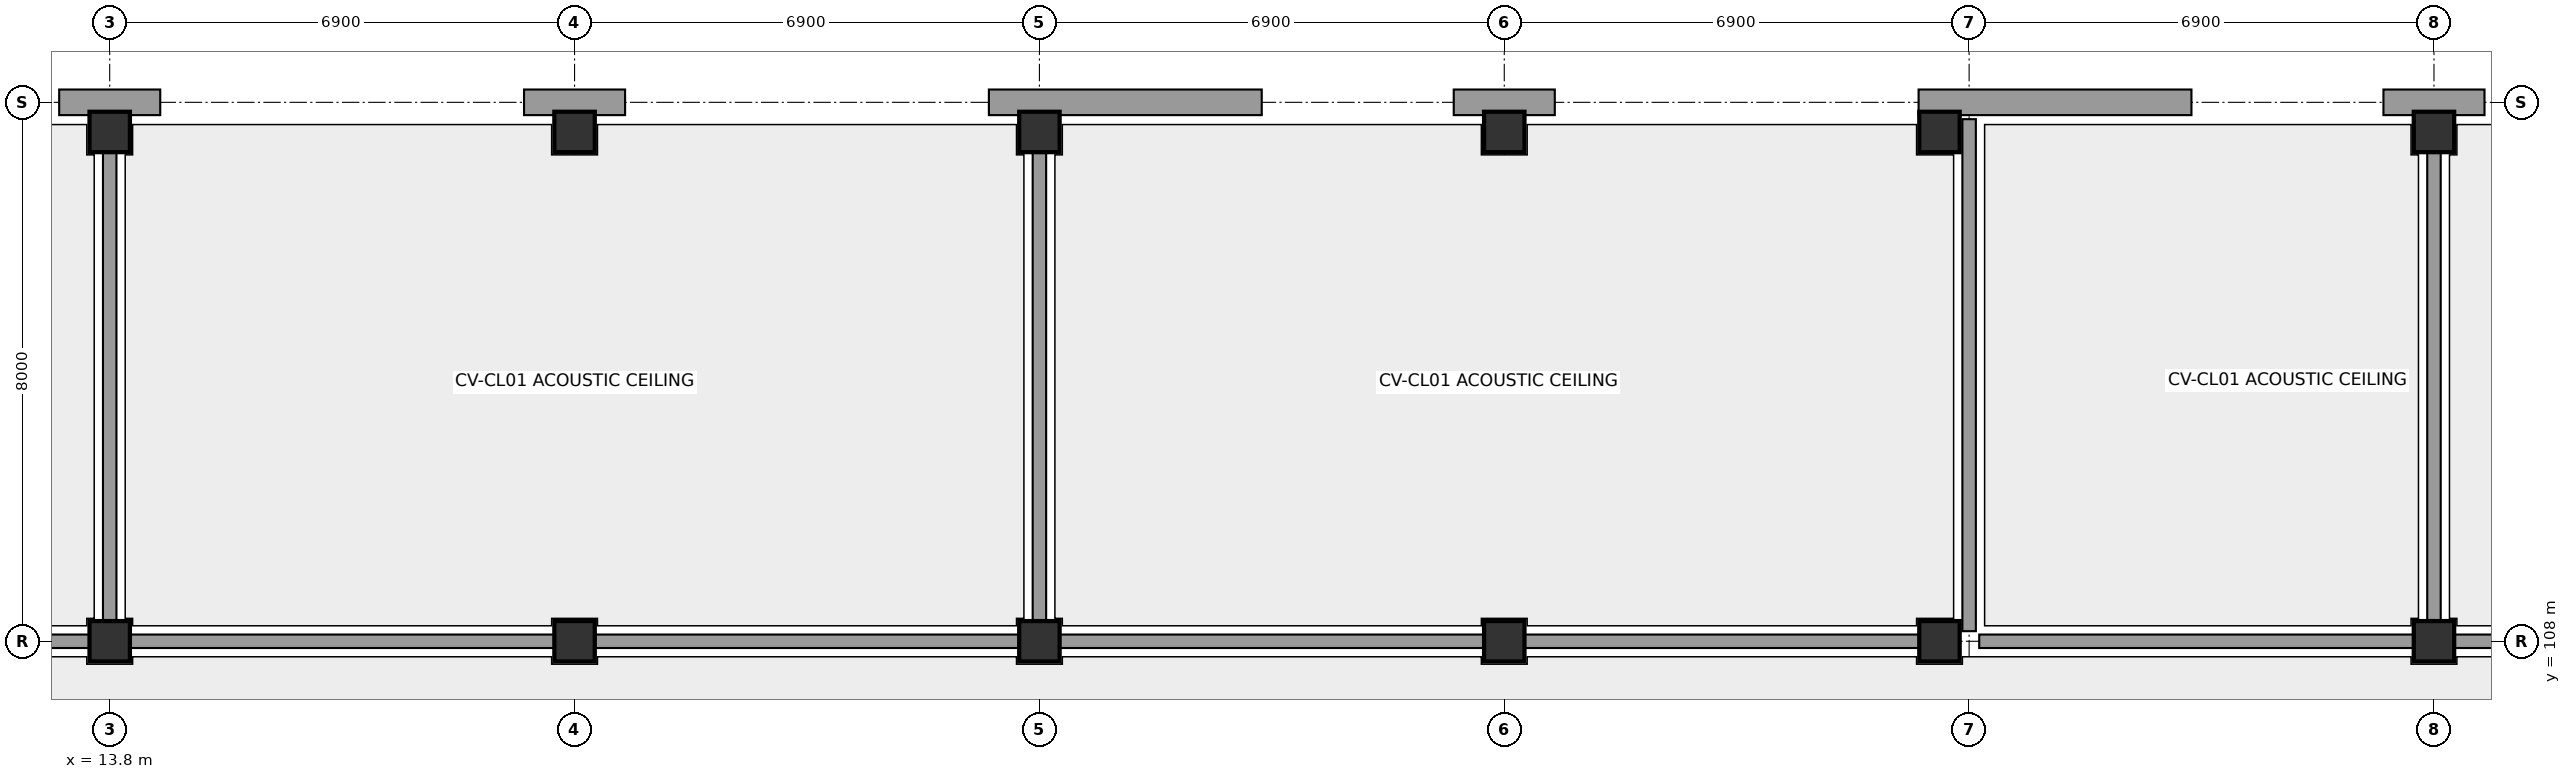
"""IFC4 building model, lengths in metres.
Left out: names, types, materials, properties, quantities, classifications, styles, units other than length and angle.
Written with IfcOpenShell. Run it as: python <this file> out.ifc"""

import sys

from ifc_helpers import new_model, si_unit, direction, frame, frame_2d, origin, origin_with_axes, origin_2d, place, context, subcontext, project, spatial, rectangle, extrude, element, fill, save


model = new_model("IFC4")
c1 = context("Model", 3, precision=1e-05, world=origin(), true_north=direction((0.0, 1.0)))
c2 = subcontext(c1, "Body", "Model", "MODEL_VIEW")
j1 = project(units=[si_unit("LENGTHUNIT", "METRE"), si_unit("PLANEANGLEUNIT", "RADIAN")], contexts=[c1])
p1 = place(None, origin())
s1 = spatial("IfcSite", under=j1, at=p1, CompositionType="ELEMENT")
p2 = place(p1, origin())
s2 = spatial("IfcBuilding", under=s1, at=p2, CompositionType="ELEMENT")
p3 = place(p2, origin())
s3 = spatial("IfcBuildingStorey", under=s2, at=p3, CompositionType="ELEMENT", Elevation=0.0)
for number, where, z_axis, x_axis in (
    (1, (13.8, 108.0, 0.0), (0.0, 0.0, 1.0), (1.0, 0.0, 0.0)),
    (2, (13.8, 115.56, 0.0), (0.0, 0.0, 1.0), (1.0, 0.0, 0.0)),
    (3, (20.7, 108.0, 0.0), (0.0, 0.0, 1.0), (1.0, 0.0, 0.0)),
    (4, (20.7, 115.56, 0.0), (0.0, 0.0, 1.0), (1.0, 0.0, 0.0)),
    (5, (27.6, 108.0, 0.0), (0.0, 0.0, 1.0), (1.0, 0.0, 0.0)),
    (6, (27.6, 115.56, 0.0), (0.0, 0.0, 1.0), (1.0, 0.0, 0.0)),
    (7, (34.5, 108.0, 0.0), (0.0, 0.0, 1.0), (1.0, 0.0, 0.0)),
    (8, (34.5, 115.56, 0.0), (0.0, 0.0, 1.0), (1.0, 0.0, 0.0)),
    (9, (40.96, 108.0, 0.0), (0.0, 0.0, 1.0), (1.0, 0.0, 0.0)),
    (10, (40.96, 115.56, 0.0), (0.0, 0.0, 1.0), (1.0, 0.0, 0.0)),
    (11, (48.3, 108.0, 0.0), (0.0, 0.0, 1.0), (1.0, 0.0, 0.0)),
    (12, (48.3, 115.56, 0.0), (0.0, 0.0, 1.0), (1.0, 0.0, 0.0)),
):
    element("IfcColumn", number, at=place(p3, frame(where, z_axis=z_axis, x_axis=x_axis)), inside=s3, PredefinedType="COLUMN", context=c2, shape_type="SweptSolid", body=[
        extrude(rectangle(XDim=0.6, YDim=0.6, at=origin_2d()), origin(), (0.0, 0.0, 1.0), 4.4),
    ])
for number, where, z_axis, x_axis in (
    (13, (13.05, 116.0, 0.0), (0.0, 0.0, 1.0), (1.0, 0.0, 0.0)),
    (14, (19.95, 116.0, 0.0), (0.0, 0.0, 1.0), (1.0, 0.0, 0.0)),
):
    element("IfcWall", number, at=place(p3, frame(where, z_axis=z_axis, x_axis=x_axis)), inside=s3, PredefinedType="STANDARD", context=c2, shape_type="SweptSolid", body=[
        extrude(rectangle(XDim=1.5, YDim=0.38, at=frame_2d((0.75, 0.0))), origin(), (0.0, 0.0, 1.0), 4.12),
    ])
p4 = place(p3, frame((26.85, 116.0, 0.0), z_axis=(0.0, 0.0, 1.0), x_axis=(1.0, 0.0, 0.0)))
e15 = element("IfcWall", 15, at=p4, inside=s3, PredefinedType="STANDARD", context=c2, shape_type="SweptSolid", body=[
    extrude(rectangle(XDim=4.05, YDim=0.38, at=frame_2d((2.025, 0.0))), origin(), (0.0, 0.0, 1.0), 4.12),
])
p5 = place(p4, frame((1.8, 0.0, 0.0)))
e16 = element("IfcOpeningElement", 16, at=p5, cuts=e15, PredefinedType="OPENING", context=c2, shape_type="SweptSolid", body=[
    extrude(rectangle(XDim=2.0, YDim=2.45, at=frame_2d((1.0, 1.225))), frame((0.0, 0.202, 0.0), z_axis=(0.0, -1.0, 0.0), x_axis=(1.0, 0.0, 0.0)), (0.0, 0.0, 1.0), 0.404),
])
p6 = place(p3, frame((33.75, 116.0, 0.0), z_axis=(0.0, 0.0, 1.0), x_axis=(1.0, 0.0, 0.0)))
e17 = element("IfcWall", 17, at=p6, inside=s3, PredefinedType="STANDARD", context=c2, shape_type="SweptSolid", body=[
    extrude(rectangle(XDim=1.5, YDim=0.38, at=frame_2d((0.75, 0.0))), origin(), (0.0, 0.0, 1.0), 4.12),
])
p7 = place(p3, frame((40.65, 116.0, 0.0), z_axis=(0.0, 0.0, 1.0), x_axis=(1.0, 0.0, 0.0)))
e18 = element("IfcWall", 18, at=p7, inside=s3, PredefinedType="STANDARD", context=c2, shape_type="SweptSolid", body=[
    extrude(rectangle(XDim=4.05, YDim=0.38, at=frame_2d((2.025, 0.0))), origin(), (0.0, 0.0, 1.0), 4.12),
])
p8 = place(p7, frame((1.8, 0.0, 0.0)))
e19 = element("IfcOpeningElement", 19, at=p8, cuts=e18, PredefinedType="OPENING", context=c2, shape_type="SweptSolid", body=[
    extrude(rectangle(XDim=2.0, YDim=2.45, at=frame_2d((1.0, 1.225))), frame((0.0, 0.202, 0.0), z_axis=(0.0, -1.0, 0.0), x_axis=(1.0, 0.0, 0.0)), (0.0, 0.0, 1.0), 0.404),
])
p9 = place(p3, frame((47.55, 116.0, 0.0), z_axis=(0.0, 0.0, 1.0), x_axis=(1.0, 0.0, 0.0)))
e20 = element("IfcWall", 20, at=p9, inside=s3, PredefinedType="STANDARD", context=c2, shape_type="SweptSolid", body=[
    extrude(rectangle(XDim=1.5, YDim=0.38, at=frame_2d((0.75, 0.0))), origin(), (0.0, 0.0, 1.0), 4.12),
])
p10 = place(p3, frame((0.3, 108.0, 0.0), z_axis=(0.0, 0.0, 1.0), x_axis=(1.0, 0.0, 0.0)))
e21 = element("IfcWall", 21, at=p10, inside=s3, PredefinedType="PARTITIONING", context=c2, shape_type="SweptSolid", body=[
    extrude(rectangle(XDim=13.35, YDim=0.2, at=frame_2d((6.675, 0.0))), origin(), (0.0, 0.0, 1.0), 3.56),
])
p11 = place(p10, frame((2.0, 0.0, 0.0)))
e22 = element("IfcOpeningElement", 22, at=p11, cuts=e21, PredefinedType="OPENING", context=c2, shape_type="SweptSolid", body=[
    extrude(rectangle(XDim=1.0, YDim=2.15, at=frame_2d((0.5, 1.075))), frame((0.0, 0.112, 0.0), z_axis=(0.0, -1.0, 0.0), x_axis=(1.0, 0.0, 0.0)), (0.0, 0.0, 1.0), 0.224),
])
p12 = place(p3, frame((13.8, 108.15, 0.0), z_axis=(0.0, 0.0, 1.0), x_axis=(0.0, 1.0, 0.0)))
e23 = element("IfcWall", 23, at=p12, inside=s3, PredefinedType="PARTITIONING", context=c2, shape_type="SweptSolid", body=[
    extrude(rectangle(XDim=7.6, YDim=0.2, at=frame_2d((3.8, 0.0))), origin(), (0.0, 0.0, 1.0), 4.12),
])
p13 = place(p3, frame((13.95, 108.0, 0.0), z_axis=(0.0, 0.0, 1.0), x_axis=(1.0, 0.0, 0.0)))
e24 = element("IfcWall", 24, at=p13, inside=s3, PredefinedType="PARTITIONING", context=c2, shape_type="SweptSolid", body=[
    extrude(rectangle(XDim=13.5, YDim=0.2, at=frame_2d((6.75, 0.0))), origin(), (0.0, 0.0, 1.0), 3.56),
])
p14 = place(p13, frame((2.0, 0.0, 0.0)))
e25 = element("IfcOpeningElement", 25, at=p14, cuts=e24, PredefinedType="OPENING", context=c2, shape_type="SweptSolid", body=[
    extrude(rectangle(XDim=1.0, YDim=2.15, at=frame_2d((0.5, 1.075))), frame((0.0, 0.112, 0.0), z_axis=(0.0, -1.0, 0.0), x_axis=(1.0, 0.0, 0.0)), (0.0, 0.0, 1.0), 0.224),
])
p15 = place(p3, frame((27.6, 108.15, 0.0), z_axis=(0.0, 0.0, 1.0), x_axis=(0.0, 1.0, 0.0)))
e26 = element("IfcWall", 26, at=p15, inside=s3, PredefinedType="PARTITIONING", context=c2, shape_type="SweptSolid", body=[
    extrude(rectangle(XDim=7.6, YDim=0.2, at=frame_2d((3.8, 0.0))), origin(), (0.0, 0.0, 1.0), 4.12),
])
p16 = place(p3, frame((27.75, 108.0, 0.0), z_axis=(0.0, 0.0, 1.0), x_axis=(1.0, 0.0, 0.0)))
e27 = element("IfcWall", 27, at=p16, inside=s3, PredefinedType="PARTITIONING", context=c2, shape_type="SweptSolid", body=[
    extrude(rectangle(XDim=13.5, YDim=0.2, at=frame_2d((6.75, 0.0))), origin(), (0.0, 0.0, 1.0), 3.56),
])
p17 = place(p16, frame((2.0, 0.0, 0.0)))
e28 = element("IfcOpeningElement", 28, at=p17, cuts=e27, PredefinedType="OPENING", context=c2, shape_type="SweptSolid", body=[
    extrude(rectangle(XDim=1.0, YDim=2.15, at=frame_2d((0.5, 1.075))), frame((0.0, 0.112, 0.0), z_axis=(0.0, -1.0, 0.0), x_axis=(1.0, 0.0, 0.0)), (0.0, 0.0, 1.0), 0.224),
])
p18 = place(p3, frame((41.4, 108.15, 0.0), z_axis=(0.0, 0.0, 1.0), x_axis=(0.0, 1.0, 0.0)))
e29 = element("IfcWall", 29, at=p18, inside=s3, PredefinedType="PARTITIONING", context=c2, shape_type="SweptSolid", body=[
    extrude(rectangle(XDim=7.6, YDim=0.2, at=frame_2d((3.8, 0.0))), origin(), (0.0, 0.0, 1.0), 4.12),
])
p19 = place(p3, frame((41.55, 108.0, 0.0), z_axis=(0.0, 0.0, 1.0), x_axis=(1.0, 0.0, 0.0)))
e30 = element("IfcWall", 30, at=p19, inside=s3, PredefinedType="PARTITIONING", context=c2, shape_type="SweptSolid", body=[
    extrude(rectangle(XDim=6.6, YDim=0.2, at=frame_2d((3.3, 0.0))), origin(), (0.0, 0.0, 1.0), 3.56),
])
p20 = place(p19, frame((2.0, 0.0, 0.0)))
e31 = element("IfcOpeningElement", 31, at=p20, cuts=e30, PredefinedType="OPENING", context=c2, shape_type="SweptSolid", body=[
    extrude(rectangle(XDim=1.0, YDim=2.15, at=frame_2d((0.5, 1.075))), frame((0.0, 0.112, 0.0), z_axis=(0.0, -1.0, 0.0), x_axis=(1.0, 0.0, 0.0)), (0.0, 0.0, 1.0), 0.224),
])
p21 = place(p3, frame((48.3, 108.15, 0.0), z_axis=(0.0, 0.0, 1.0), x_axis=(0.0, 1.0, 0.0)))
e32 = element("IfcWall", 32, at=p21, inside=s3, PredefinedType="PARTITIONING", context=c2, shape_type="SweptSolid", body=[
    extrude(rectangle(XDim=7.6, YDim=0.2, at=frame_2d((3.8, 0.0))), origin(), (0.0, 0.0, 1.0), 3.56),
])
p22 = place(p3, frame((48.45, 108.0, 0.0), z_axis=(0.0, 0.0, 1.0), x_axis=(1.0, 0.0, 0.0)))
e33 = element("IfcWall", 33, at=p22, inside=s3, PredefinedType="PARTITIONING", context=c2, shape_type="SweptSolid", body=[
    extrude(rectangle(XDim=6.45, YDim=0.2, at=frame_2d((3.225, 0.0))), origin(), (0.0, 0.0, 1.0), 3.56),
])
p23 = place(p22, frame((2.0, 0.0, 0.0)))
e34 = element("IfcOpeningElement", 34, at=p23, cuts=e33, PredefinedType="OPENING", context=c2, shape_type="SweptSolid", body=[
    extrude(rectangle(XDim=1.0, YDim=2.15, at=frame_2d((0.5, 1.075))), frame((0.0, 0.112, 0.0), z_axis=(0.0, -1.0, 0.0), x_axis=(1.0, 0.0, 0.0)), (0.0, 0.0, 1.0), 0.224),
])
p24 = place(p5, origin_with_axes())
e35 = element("IfcDoor", 35, at=p24, inside=s3, OperationType="DOUBLE_DOOR_SINGLE_SWING", PredefinedType="DOOR", context=c2, shape_type="SweptSolid", body=[
    extrude(rectangle(XDim=2.0, YDim=2.45, at=frame_2d((1.0, 1.225))), frame((0.0, 0.025, 0.0), z_axis=(0.0, -1.0, 0.0), x_axis=(1.0, 0.0, 0.0)), (0.0, 0.0, 1.0), 0.05),
])
fill(e16, e35)
p25 = place(p8, origin_with_axes())
e36 = element("IfcDoor", 36, at=p25, inside=s3, OperationType="DOUBLE_DOOR_SINGLE_SWING", PredefinedType="DOOR", context=c2, shape_type="SweptSolid", body=[
    extrude(rectangle(XDim=2.0, YDim=2.45, at=frame_2d((1.0, 1.225))), frame((0.0, 0.025, 0.0), z_axis=(0.0, -1.0, 0.0), x_axis=(1.0, 0.0, 0.0)), (0.0, 0.0, 1.0), 0.05),
])
fill(e19, e36)
p26 = place(p14, origin_with_axes())
e37 = element("IfcDoor", 37, at=p26, inside=s3, OperationType="SINGLE_SWING_RIGHT", PredefinedType="DOOR", context=c2, shape_type="SweptSolid", body=[
    extrude(rectangle(XDim=1.0, YDim=2.15, at=frame_2d((0.5, 1.075))), frame((0.0, 0.025, 0.0), z_axis=(0.0, -1.0, 0.0), x_axis=(1.0, 0.0, 0.0)), (0.0, 0.0, 1.0), 0.05),
])
fill(e25, e37)
p27 = place(p17, frame((1.0, 0.0, 0.0), z_axis=(0.0, 0.0, 1.0), x_axis=(-1.0, 0.0, 0.0)))
e38 = element("IfcDoor", 38, at=p27, inside=s3, OperationType="SINGLE_SWING_LEFT", PredefinedType="DOOR", context=c2, shape_type="SweptSolid", body=[
    extrude(rectangle(XDim=1.0, YDim=2.15, at=frame_2d((0.5, 1.075))), frame((0.0, 0.025, 0.0), z_axis=(0.0, -1.0, 0.0), x_axis=(1.0, 0.0, 0.0)), (0.0, 0.0, 1.0), 0.05),
])
fill(e28, e38)
p28 = place(p20, origin_with_axes())
e39 = element("IfcDoor", 39, at=p28, inside=s3, OperationType="SINGLE_SWING_RIGHT", PredefinedType="DOOR", context=c2, shape_type="SweptSolid", body=[
    extrude(rectangle(XDim=1.0, YDim=2.15, at=frame_2d((0.5, 1.075))), frame((0.0, 0.025, 0.0), z_axis=(0.0, -1.0, 0.0), x_axis=(1.0, 0.0, 0.0)), (0.0, 0.0, 1.0), 0.05),
])
fill(e31, e39)
save(model, sys.argv[1])
